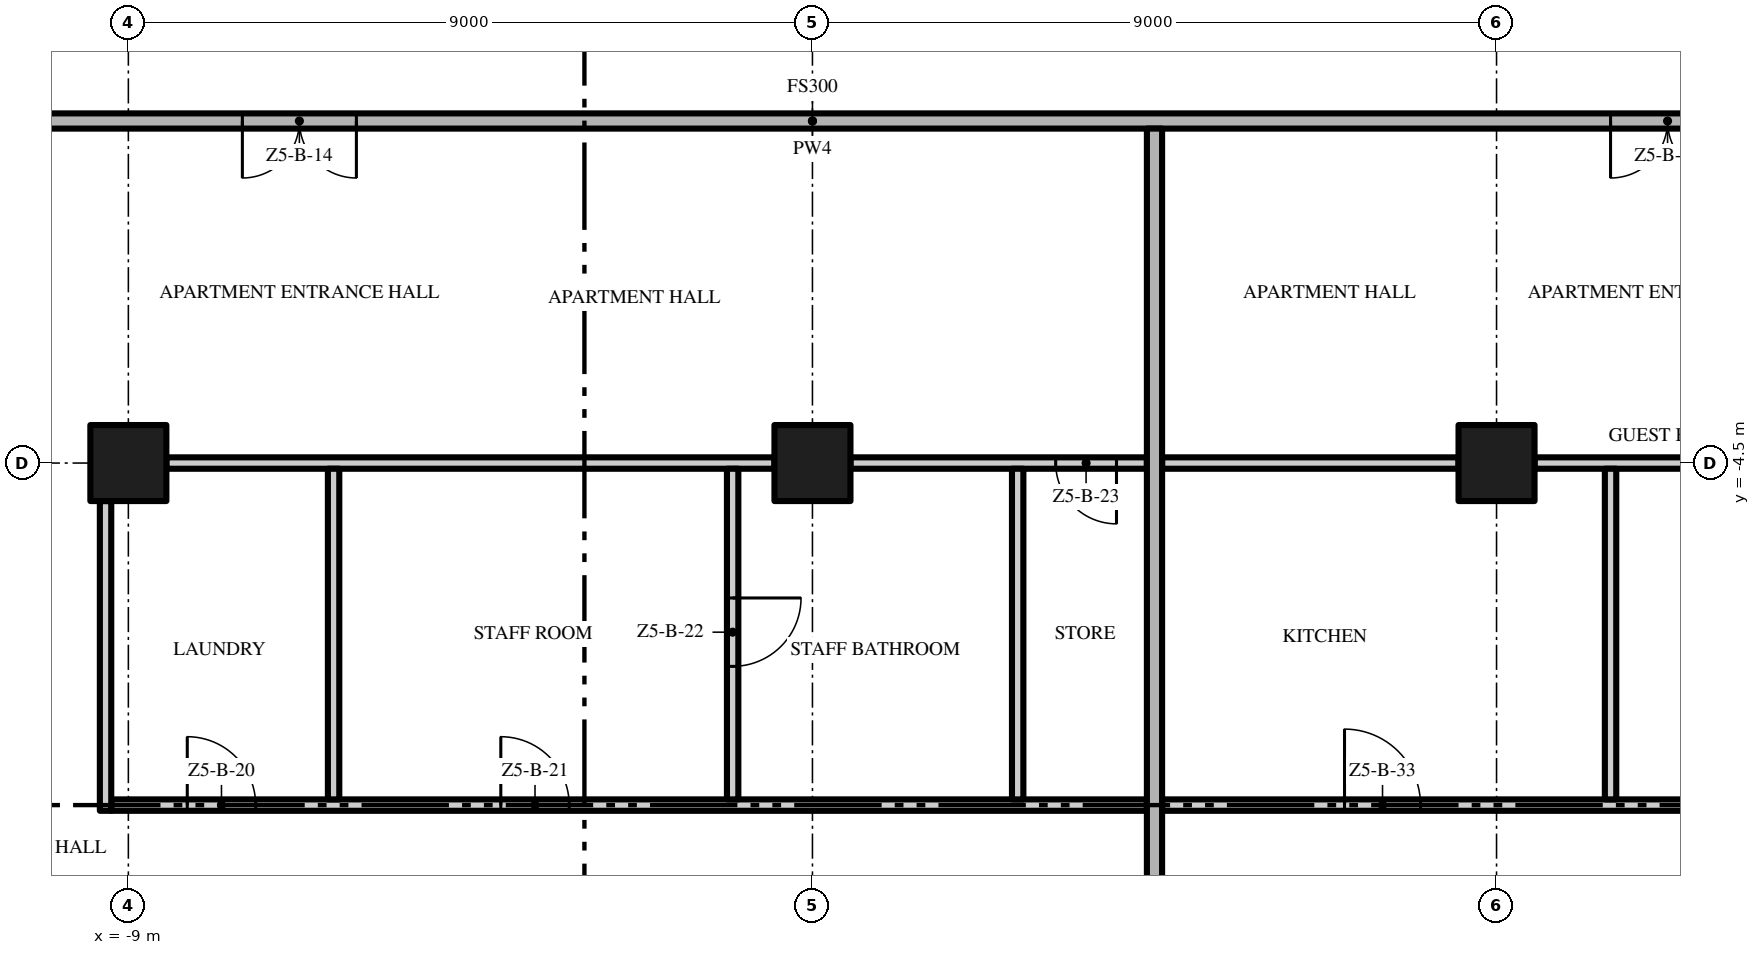
"""IFC4 building model, lengths in metres.
Left out: names, types, materials, properties, quantities, classifications, styles, units other than length and angle.
Written with IfcOpenShell. Run it as: python <this file> out.ifc"""

import sys

from ifc_helpers import new_model, si_unit, direction, frame, frame_2d, origin, origin_2d, place, context, subcontext, project, spatial, rectangle, extrude, element, fill, save


model = new_model("IFC4")
c1 = context("Model", 3, precision=1e-05, world=origin(), true_north=direction((0.0, 1.0)))
c2 = subcontext(c1, "Body", "Model", "MODEL_VIEW")
j1 = project(units=[si_unit("LENGTHUNIT", "METRE"), si_unit("PLANEANGLEUNIT", "RADIAN")], contexts=[c1])
p1 = place(None, origin())
s1 = spatial("IfcSite", under=j1, at=p1, CompositionType="ELEMENT")
p2 = place(p1, origin())
s2 = spatial("IfcBuilding", under=s1, at=p2, CompositionType="ELEMENT")
p3 = place(p2, frame((0.0, 0.0, 250.2)))
s3 = spatial("IfcBuildingStorey", under=s2, at=p3, CompositionType="ELEMENT", Elevation=250.2)
for number, where, z_axis, x_axis in (
    (1, (-9.0, -4.5, 0.0), (0.0, 0.0, 1.0), (1.0, 0.0, 0.0)),
    (2, (0.0, -4.5, 0.0), (0.0, 0.0, 1.0), (1.0, 0.0, 0.0)),
    (3, (9.0, -4.5, 0.0), (0.0, 0.0, 1.0), (1.0, 0.0, 0.0)),
):
    element("IfcColumn", number, at=place(p3, frame(where, z_axis=z_axis, x_axis=x_axis)), inside=s3, PredefinedType="COLUMN", context=c2, shape_type="SweptSolid", body=[
        extrude(rectangle(XDim=1.0, YDim=1.0, at=origin_2d()), origin(), (0.0, 0.0, 1.0), 3.5),
    ])
p4 = place(p3, frame((-9.225, -9.0, 0.0), z_axis=(0.0, 0.0, 1.0), x_axis=(1.0, 0.0, 0.0)))
e4 = element("IfcWall", 4, at=p4, inside=s3, PredefinedType="PARTITIONING", context=c2, shape_type="SweptSolid", body=[
    extrude(rectangle(XDim=13.625, YDim=0.15, at=frame_2d((6.812, 0.0))), origin(), (0.0, 0.0, 1.0), 3.5),
])
p5 = place(p4, frame((1.0, 0.0, 0.0)))
e5 = element("IfcOpeningElement", 5, at=p5, cuts=e4, PredefinedType="OPENING", context=c2, shape_type="SweptSolid", body=[
    extrude(rectangle(XDim=0.9, YDim=2.1, at=frame_2d((0.45, 1.05))), frame((0.0, 0.085, 0.0), z_axis=(0.0, -1.0, 0.0), x_axis=(1.0, 0.0, 0.0)), (0.0, 0.0, 1.0), 0.17),
])
p6 = place(p4, frame((5.125, 0.0, 0.0)))
e6 = element("IfcOpeningElement", 6, at=p6, cuts=e4, PredefinedType="OPENING", context=c2, shape_type="SweptSolid", body=[
    extrude(rectangle(XDim=0.9, YDim=2.1, at=frame_2d((0.45, 1.05))), frame((0.0, 0.085, 0.0), z_axis=(0.0, -1.0, 0.0), x_axis=(1.0, 0.0, 0.0)), (0.0, 0.0, 1.0), 0.17),
])
p7 = place(p3, frame((4.6, -9.0, 0.0), z_axis=(0.0, 0.0, 1.0), x_axis=(1.0, 0.0, 0.0)))
e7 = element("IfcWall", 7, at=p7, inside=s3, PredefinedType="PARTITIONING", context=c2, shape_type="SweptSolid", body=[
    extrude(rectangle(XDim=8.075, YDim=0.15, at=frame_2d((4.037, 0.0))), origin(), (0.0, 0.0, 1.0), 3.5),
])
p8 = place(p7, frame((2.4, 0.0, 0.0)))
e8 = element("IfcOpeningElement", 8, at=p8, cuts=e7, PredefinedType="OPENING", context=c2, shape_type="SweptSolid", body=[
    extrude(rectangle(XDim=1.0, YDim=2.4, at=frame_2d((0.5, 1.2))), frame((0.0, 0.085, 0.0), z_axis=(0.0, -1.0, 0.0), x_axis=(1.0, 0.0, 0.0)), (0.0, 0.0, 1.0), 0.17),
])
p9 = place(p3, frame((-8.5, -4.5, 0.0), z_axis=(0.0, 0.0, 1.0), x_axis=(1.0, 0.0, 0.0)))
e9 = element("IfcWall", 9, at=p9, inside=s3, PredefinedType="PARTITIONING", context=c2, shape_type="SweptSolid", body=[
    extrude(rectangle(XDim=8.0, YDim=0.15, at=frame_2d((4.0, 0.0))), origin(), (0.0, 0.0, 1.0), 3.5),
])
p10 = place(p3, frame((4.4, -4.5, 0.0), z_axis=(0.0, 0.0, 1.0), x_axis=(-1.0, 0.0, 0.0)))
e10 = element("IfcWall", 10, at=p10, inside=s3, PredefinedType="PARTITIONING", context=c2, shape_type="SweptSolid", body=[
    extrude(rectangle(XDim=3.9, YDim=0.15, at=frame_2d((1.95, 0.0))), origin(), (0.0, 0.0, 1.0), 3.5),
])
p11 = place(p10, frame((0.4, 0.0, 0.0)))
e11 = element("IfcOpeningElement", 11, at=p11, cuts=e10, PredefinedType="OPENING", context=c2, shape_type="SweptSolid", body=[
    extrude(rectangle(XDim=0.8, YDim=2.0, at=frame_2d((0.4, 1.0))), frame((0.0, 0.085, 0.0), z_axis=(0.0, -1.0, 0.0), x_axis=(1.0, 0.0, 0.0)), (0.0, 0.0, 1.0), 0.17),
])
p12 = place(p3, frame((4.6, -4.5, 0.0), z_axis=(0.0, 0.0, 1.0), x_axis=(1.0, 0.0, 0.0)))
e12 = element("IfcWall", 12, at=p12, inside=s3, PredefinedType="PARTITIONING", context=c2, shape_type="SweptSolid", body=[
    extrude(rectangle(XDim=3.9, YDim=0.15, at=frame_2d((1.95, 0.0))), origin(), (0.0, 0.0, 1.0), 3.5),
])
p13 = place(p3, frame((9.5, -4.5, 0.0), z_axis=(0.0, 0.0, 1.0), x_axis=(1.0, 0.0, 0.0)))
e13 = element("IfcWall", 13, at=p13, inside=s3, PredefinedType="PARTITIONING", context=c2, shape_type="SweptSolid", body=[
    extrude(rectangle(XDim=4.0, YDim=0.15, at=frame_2d((2.0, 0.0))), origin(), (0.0, 0.0, 1.0), 3.5),
])
p14 = place(p3, frame((17.4, 0.0, 0.0), z_axis=(0.0, 0.0, 1.0), x_axis=(-1.0, 0.0, 0.0)))
e14 = element("IfcWall", 14, at=p14, inside=s3, PredefinedType="PARTITIONING", context=c2, shape_type="SweptSolid", body=[
    extrude(rectangle(XDim=34.8, YDim=0.2, at=frame_2d((17.4, 0.0))), origin(), (0.0, 0.0, 1.0), 3.5),
])
p15 = place(p14, frame((23.4, 0.0, 0.0)))
e15 = element("IfcOpeningElement", 15, at=p15, cuts=e14, PredefinedType="OPENING", context=c2, shape_type="SweptSolid", body=[
    extrude(rectangle(XDim=1.5, YDim=2.4, at=frame_2d((0.75, 1.2))), frame((0.0, 0.11, 0.0), z_axis=(0.0, -1.0, 0.0), x_axis=(1.0, 0.0, 0.0)), (0.0, 0.0, 1.0), 0.22),
])
p16 = place(p14, frame((5.4, 0.0, 0.0)))
e16 = element("IfcOpeningElement", 16, at=p16, cuts=e14, PredefinedType="OPENING", context=c2, shape_type="SweptSolid", body=[
    extrude(rectangle(XDim=1.5, YDim=2.4, at=frame_2d((0.75, 1.2))), frame((0.0, 0.11, 0.0), z_axis=(0.0, -1.0, 0.0), x_axis=(1.0, 0.0, 0.0)), (0.0, 0.0, 1.0), 0.22),
])
p17 = place(p3, frame((-9.3, -9.075, 0.0), z_axis=(0.0, 0.0, 1.0), x_axis=(0.0, 1.0, 0.0)))
e17 = element("IfcWall", 17, at=p17, inside=s3, PredefinedType="PARTITIONING", context=c2, shape_type="SweptSolid", body=[
    extrude(rectangle(XDim=4.075, YDim=0.15, at=frame_2d((2.038, 0.0))), origin(), (0.0, 0.0, 1.0), 3.5),
])
p18 = place(p3, frame((-6.3, -8.925, 0.0), z_axis=(0.0, 0.0, 1.0), x_axis=(0.0, 1.0, 0.0)))
e18 = element("IfcWall", 18, at=p18, inside=s3, PredefinedType="PARTITIONING", context=c2, shape_type="SweptSolid", body=[
    extrude(rectangle(XDim=4.35, YDim=0.15, at=frame_2d((2.175, 0.0))), origin(), (0.0, 0.0, 1.0), 3.5),
])
p19 = place(p3, frame((-1.05, -4.575, 0.0), z_axis=(0.0, 0.0, 1.0), x_axis=(0.0, -1.0, 0.0)))
e19 = element("IfcWall", 19, at=p19, inside=s3, PredefinedType="PARTITIONING", context=c2, shape_type="SweptSolid", body=[
    extrude(rectangle(XDim=4.35, YDim=0.15, at=frame_2d((2.175, 0.0))), origin(), (0.0, 0.0, 1.0), 3.5),
])
p20 = place(p19, frame((1.7, 0.0, 0.0)))
e20 = element("IfcOpeningElement", 20, at=p20, cuts=e19, PredefinedType="OPENING", context=c2, shape_type="SweptSolid", body=[
    extrude(rectangle(XDim=0.9, YDim=2.1, at=frame_2d((0.45, 1.05))), frame((0.0, 0.085, 0.0), z_axis=(0.0, -1.0, 0.0), x_axis=(1.0, 0.0, 0.0)), (0.0, 0.0, 1.0), 0.17),
])
p21 = place(p3, frame((2.7, -8.925, 0.0), z_axis=(0.0, 0.0, 1.0), x_axis=(0.0, 1.0, 0.0)))
e21 = element("IfcWall", 21, at=p21, inside=s3, PredefinedType="PARTITIONING", context=c2, shape_type="SweptSolid", body=[
    extrude(rectangle(XDim=4.35, YDim=0.15, at=frame_2d((2.175, 0.0))), origin(), (0.0, 0.0, 1.0), 3.5),
])
p22 = place(p3, frame((4.5, -22.2, 0.0), z_axis=(0.0, 0.0, 1.0), x_axis=(0.0, 1.0, 0.0)))
e22 = element("IfcWall", 22, at=p22, inside=s3, PredefinedType="PARTITIONING", context=c2, shape_type="SweptSolid", body=[
    extrude(rectangle(XDim=22.1, YDim=0.2, at=frame_2d((11.05, 0.0))), origin(), (0.0, 0.0, 1.0), 3.5),
])
p23 = place(p3, frame((10.5, -8.925, 0.0), z_axis=(0.0, 0.0, 1.0), x_axis=(0.0, 1.0, 0.0)))
e23 = element("IfcWall", 23, at=p23, inside=s3, PredefinedType="PARTITIONING", context=c2, shape_type="SweptSolid", body=[
    extrude(rectangle(XDim=4.35, YDim=0.15, at=frame_2d((2.175, 0.0))), origin(), (0.0, 0.0, 1.0), 3.5),
])
p24 = place(p15, origin())
e24 = element("IfcDoor", 24, at=p24, inside=s3, OperationType="DOUBLE_DOOR_SINGLE_SWING", PredefinedType="DOOR", context=c2, shape_type="SweptSolid", body=[
    extrude(rectangle(XDim=1.5, YDim=2.4, at=frame_2d((0.75, 1.2))), frame((0.0, 0.025, 0.0), z_axis=(0.0, -1.0, 0.0), x_axis=(1.0, 0.0, 0.0)), (0.0, 0.0, 1.0), 0.05),
])
fill(e15, e24)
p25 = place(p5, origin())
e25 = element("IfcDoor", 25, at=p25, inside=s3, OperationType="SINGLE_SWING_LEFT", PredefinedType="DOOR", context=c2, shape_type="SweptSolid", body=[
    extrude(rectangle(XDim=0.9, YDim=2.1, at=frame_2d((0.45, 1.05))), frame((0.0, 0.025, 0.0), z_axis=(0.0, -1.0, 0.0), x_axis=(1.0, 0.0, 0.0)), (0.0, 0.0, 1.0), 0.05),
])
fill(e5, e25)
p26 = place(p6, origin())
e26 = element("IfcDoor", 26, at=p26, inside=s3, OperationType="SINGLE_SWING_LEFT", PredefinedType="DOOR", context=c2, shape_type="SweptSolid", body=[
    extrude(rectangle(XDim=0.9, YDim=2.1, at=frame_2d((0.45, 1.05))), frame((0.0, 0.025, 0.0), z_axis=(0.0, -1.0, 0.0), x_axis=(1.0, 0.0, 0.0)), (0.0, 0.0, 1.0), 0.05),
])
fill(e6, e26)
p27 = place(p20, origin())
e27 = element("IfcDoor", 27, at=p27, inside=s3, OperationType="SINGLE_SWING_LEFT", PredefinedType="DOOR", context=c2, shape_type="SweptSolid", body=[
    extrude(rectangle(XDim=0.9, YDim=2.1, at=frame_2d((0.45, 1.05))), frame((0.0, 0.025, 0.0), z_axis=(0.0, -1.0, 0.0), x_axis=(1.0, 0.0, 0.0)), (0.0, 0.0, 1.0), 0.05),
])
fill(e20, e27)
p28 = place(p11, origin())
e28 = element("IfcDoor", 28, at=p28, inside=s3, OperationType="SINGLE_SWING_LEFT", PredefinedType="DOOR", context=c2, shape_type="SweptSolid", body=[
    extrude(rectangle(XDim=0.8, YDim=2.0, at=frame_2d((0.4, 1.0))), frame((0.0, 0.025, 0.0), z_axis=(0.0, -1.0, 0.0), x_axis=(1.0, 0.0, 0.0)), (0.0, 0.0, 1.0), 0.05),
])
fill(e11, e28)
p29 = place(p16, origin())
e29 = element("IfcDoor", 29, at=p29, inside=s3, OperationType="DOUBLE_DOOR_SINGLE_SWING", PredefinedType="DOOR", context=c2, shape_type="SweptSolid", body=[
    extrude(rectangle(XDim=1.5, YDim=2.4, at=frame_2d((0.75, 1.2))), frame((0.0, 0.025, 0.0), z_axis=(0.0, -1.0, 0.0), x_axis=(1.0, 0.0, 0.0)), (0.0, 0.0, 1.0), 0.05),
])
fill(e16, e29)
p30 = place(p8, origin())
e30 = element("IfcDoor", 30, at=p30, inside=s3, OperationType="SINGLE_SWING_LEFT", PredefinedType="DOOR", context=c2, shape_type="SweptSolid", body=[
    extrude(rectangle(XDim=1.0, YDim=2.4, at=frame_2d((0.5, 1.2))), frame((0.0, 0.025, 0.0), z_axis=(0.0, -1.0, 0.0), x_axis=(1.0, 0.0, 0.0)), (0.0, 0.0, 1.0), 0.05),
])
fill(e8, e30)
save(model, sys.argv[1])
